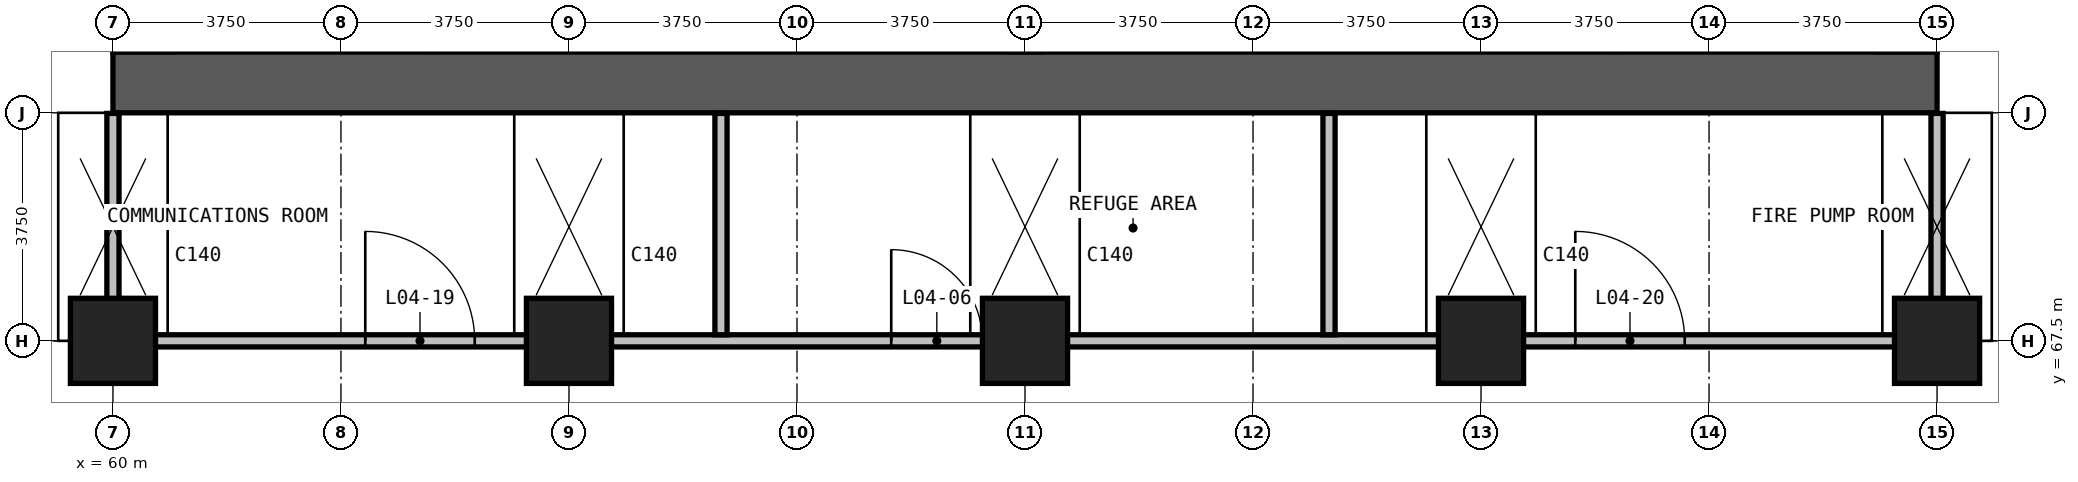
"""IFC4 building model, lengths in metres.
Left out: names, types, materials, properties, quantities, classifications, styles, units other than length and angle.
Written with IfcOpenShell. Run it as: python <this file> out.ifc"""

import sys

from ifc_helpers import new_model, si_unit, direction, frame, frame_2d, origin, origin_2d, place, context, subcontext, project, spatial, rectangle, extrude, element, fill, save


model = new_model("IFC4")
c1 = context("Model", 3, precision=1e-05, world=origin(), true_north=direction((0.0, 1.0)))
c2 = subcontext(c1, "Body", "Model", "MODEL_VIEW")
j1 = project(units=[si_unit("LENGTHUNIT", "METRE"), si_unit("PLANEANGLEUNIT", "RADIAN")], contexts=[c1])
p1 = place(None, origin())
s1 = spatial("IfcSite", under=j1, at=p1, CompositionType="ELEMENT")
p2 = place(p1, origin())
s2 = spatial("IfcBuilding", under=s1, at=p2, CompositionType="ELEMENT")
p3 = place(p2, frame((0.0, 0.0, 30.0)))
s3 = spatial("IfcBuildingStorey", under=s2, at=p3, CompositionType="ELEMENT", Elevation=30.0)
for number, where, z_axis, x_axis in (
    (1, (60.0, 67.5, 0.0), (0.0, 0.0, 1.0), (1.0, 0.0, 0.0)),
    (2, (67.5, 67.5, 0.0), (0.0, 0.0, 1.0), (1.0, 0.0, 0.0)),
    (3, (75.0, 67.5, 0.0), (0.0, 0.0, 1.0), (1.0, 0.0, 0.0)),
    (4, (82.5, 67.5, 0.0), (0.0, 0.0, 1.0), (1.0, 0.0, 0.0)),
    (5, (90.0, 67.5, 0.0), (0.0, 0.0, 1.0), (1.0, 0.0, 0.0)),
):
    element("IfcColumn", number, at=place(p3, frame(where, z_axis=z_axis, x_axis=x_axis)), inside=s3, PredefinedType="COLUMN", context=c2, shape_type="SweptSolid", body=[
        extrude(rectangle(XDim=1.4, YDim=1.4, at=origin_2d()), origin(), (0.0, 0.0, 1.0), 5.0),
    ])
p4 = place(p3, frame((60.0, 71.75, 0.0), z_axis=(0.0, 0.0, 1.0), x_axis=(1.0, 0.0, 0.0)))
e6 = element("IfcWall", 6, at=p4, inside=s3, PredefinedType="SHEAR", context=c2, shape_type="SweptSolid", body=[
    extrude(rectangle(XDim=30.0, YDim=1.0, at=frame_2d((15.0, 0.0))), origin(), (0.0, 0.0, 1.0), 5.0),
])
p5 = place(p3, frame((60.1, 67.5, 0.0), z_axis=(0.0, 0.0, 1.0), x_axis=(1.0, 0.0, 0.0)))
e7 = element("IfcWall", 7, at=p5, inside=s3, PredefinedType="PARTITIONING", context=c2, shape_type="SweptSolid", body=[
    extrude(rectangle(XDim=29.8, YDim=0.2, at=frame_2d((14.9, 0.0))), origin(), (0.0, 0.0, 1.0), 4.7),
])
p6 = place(p5, frame((12.7, 0.0, 0.0)))
e8 = element("IfcOpeningElement", 8, at=p6, cuts=e7, PredefinedType="OPENING", context=c2, shape_type="SweptSolid", body=[
    extrude(rectangle(XDim=1.5, YDim=2.2, at=frame_2d((0.75, 1.1))), frame((0.0, 0.11, 0.0), z_axis=(0.0, -1.0, 0.0), x_axis=(1.0, 0.0, 0.0)), (0.0, 0.0, 1.0), 0.22),
])
p7 = place(p5, frame((4.05, 0.0, 0.0)))
e9 = element("IfcOpeningElement", 9, at=p7, cuts=e7, PredefinedType="OPENING", context=c2, shape_type="SweptSolid", body=[
    extrude(rectangle(XDim=1.8, YDim=2.3, at=frame_2d((0.9, 1.15))), frame((0.0, 0.11, 0.0), z_axis=(0.0, -1.0, 0.0), x_axis=(1.0, 0.0, 0.0)), (0.0, 0.0, 1.0), 0.22),
])
p8 = place(p5, frame((23.95, 0.0, 0.0)))
e10 = element("IfcOpeningElement", 10, at=p8, cuts=e7, PredefinedType="OPENING", context=c2, shape_type="SweptSolid", body=[
    extrude(rectangle(XDim=1.8, YDim=2.3, at=frame_2d((0.9, 1.15))), frame((0.0, 0.11, 0.0), z_axis=(0.0, -1.0, 0.0), x_axis=(1.0, 0.0, 0.0)), (0.0, 0.0, 1.0), 0.22),
])
p9 = place(p3, frame((60.0, 67.4, 0.0), z_axis=(0.0, 0.0, 1.0), x_axis=(0.0, 1.0, 0.0)))
e11 = element("IfcWall", 11, at=p9, inside=s3, PredefinedType="PARTITIONING", context=c2, shape_type="SweptSolid", body=[
    extrude(rectangle(XDim=3.84, YDim=0.2, at=frame_2d((1.92, 0.0))), origin(), (0.0, 0.0, 1.0), 4.7),
])
for number, where, z_axis, x_axis in (
    (12, (70.0, 67.6, 0.0), (0.0, 0.0, 1.0), (0.0, 1.0, 0.0)),
    (13, (80.0, 67.6, 0.0), (0.0, 0.0, 1.0), (0.0, 1.0, 0.0)),
):
    element("IfcWall", number, at=place(p3, frame(where, z_axis=z_axis, x_axis=x_axis)), inside=s3, PredefinedType="PARTITIONING", context=c2, shape_type="SweptSolid", body=[
        extrude(rectangle(XDim=3.64, YDim=0.2, at=frame_2d((1.82, 0.0))), origin(), (0.0, 0.0, 1.0), 4.7),
    ])
p10 = place(p3, frame((90.0, 67.4, 0.0), z_axis=(0.0, 0.0, 1.0), x_axis=(0.0, 1.0, 0.0)))
e14 = element("IfcWall", 14, at=p10, inside=s3, PredefinedType="PARTITIONING", context=c2, shape_type="SweptSolid", body=[
    extrude(rectangle(XDim=3.84, YDim=0.2, at=frame_2d((1.92, 0.0))), origin(), (0.0, 0.0, 1.0), 4.7),
])
p11 = place(p6, origin())
e15 = element("IfcDoor", 15, at=p11, inside=s3, OperationType="DOUBLE_DOOR_SINGLE_SWING", PredefinedType="DOOR", context=c2, shape_type="SweptSolid", body=[
    extrude(rectangle(XDim=1.5, YDim=2.2, at=frame_2d((0.75, 1.1))), frame((0.0, 0.025, 0.0), z_axis=(0.0, -1.0, 0.0), x_axis=(1.0, 0.0, 0.0)), (0.0, 0.0, 1.0), 0.05),
])
fill(e8, e15)
p12 = place(p7, origin())
e16 = element("IfcDoor", 16, at=p12, inside=s3, OperationType="DOUBLE_DOOR_SINGLE_SWING", PredefinedType="DOOR", context=c2, shape_type="SweptSolid", body=[
    extrude(rectangle(XDim=1.8, YDim=2.3, at=frame_2d((0.9, 1.15))), frame((0.0, 0.025, 0.0), z_axis=(0.0, -1.0, 0.0), x_axis=(1.0, 0.0, 0.0)), (0.0, 0.0, 1.0), 0.05),
])
fill(e9, e16)
p13 = place(p8, origin())
e17 = element("IfcDoor", 17, at=p13, inside=s3, OperationType="DOUBLE_DOOR_SINGLE_SWING", PredefinedType="DOOR", context=c2, shape_type="SweptSolid", body=[
    extrude(rectangle(XDim=1.8, YDim=2.3, at=frame_2d((0.9, 1.15))), frame((0.0, 0.025, 0.0), z_axis=(0.0, -1.0, 0.0), x_axis=(1.0, 0.0, 0.0)), (0.0, 0.0, 1.0), 0.05),
])
fill(e10, e17)
save(model, sys.argv[1])
